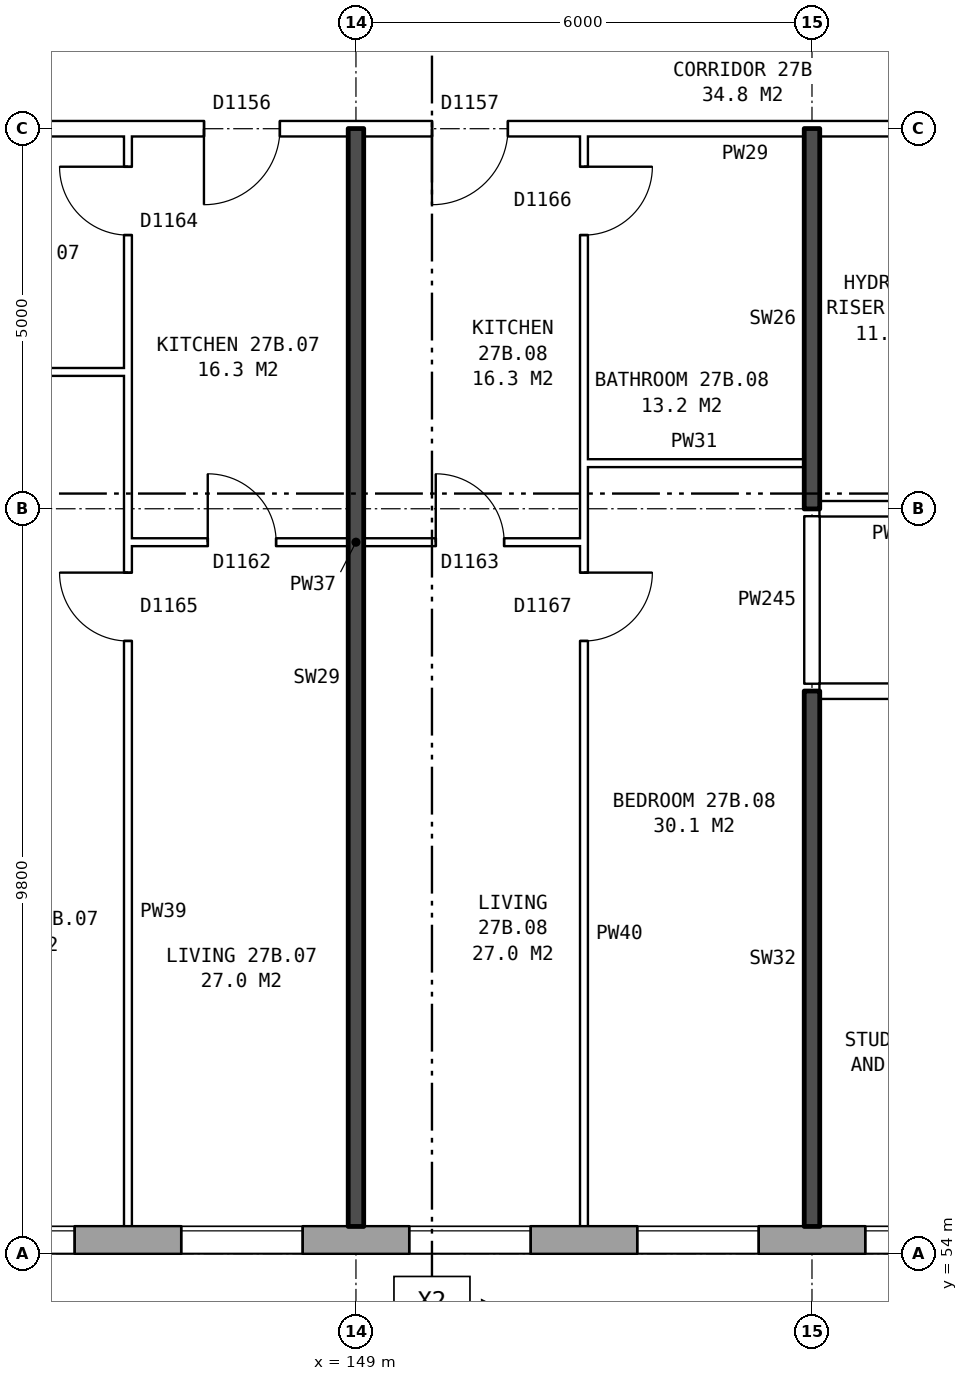
"""IFC4 building model, lengths in metres.
Left out: names, types, materials, properties, quantities, classifications, styles, units other than length and angle.
Written with IfcOpenShell. Run it as: python <this file> out.ifc"""

import sys

from ifc_helpers import new_model, si_unit, direction, frame, frame_2d, origin, place, context, subcontext, project, spatial, rectangle, extrude, element, fill, save


model = new_model("IFC4")
c1 = context("Model", 3, precision=1e-05, world=origin(), true_north=direction((0.0, 1.0)))
c2 = subcontext(c1, "Body", "Model", "MODEL_VIEW")
j1 = project(units=[si_unit("LENGTHUNIT", "METRE"), si_unit("PLANEANGLEUNIT", "RADIAN")], contexts=[c1])
p1 = place(None, origin())
s1 = spatial("IfcSite", under=j1, at=p1, CompositionType="ELEMENT")
p2 = place(p1, origin())
s2 = spatial("IfcBuilding", under=s1, at=p2, CompositionType="ELEMENT")
p3 = place(p2, frame((0.0, 0.0, 99.5)))
s3 = spatial("IfcBuildingStorey", under=s2, at=p3, CompositionType="ELEMENT", Elevation=99.5)
p4 = place(p3, frame((134.075, 54.18, 0.0), z_axis=(0.0, 0.0, 1.0), x_axis=(1.0, 0.0, 0.0)))
e1 = element("IfcWall", 1, at=p4, inside=s3, PredefinedType="STANDARD", context=c2, shape_type="SweptSolid", body=[
    extrude(rectangle(XDim=36.851, YDim=0.36, at=frame_2d((18.425, 0.0))), origin(), (0.0, 0.0, 1.0), 2.85),
])
p5 = place(p4, frame((0.3, 0.0, 0.8)))
e2 = element("IfcOpeningElement", 2, at=p5, cuts=e1, PredefinedType="OPENING", context=c2, shape_type="SweptSolid", body=[
    extrude(rectangle(XDim=1.0, YDim=1.8, at=frame_2d((0.5, 0.9))), frame((0.0, 0.19, 0.0), z_axis=(0.0, -1.0, 0.0), x_axis=(1.0, 0.0, 0.0)), (0.0, 0.0, 1.0), 0.38),
])
p6 = place(p4, frame((3.575, 0.0, 0.8)))
e3 = element("IfcOpeningElement", 3, at=p6, cuts=e1, PredefinedType="OPENING", context=c2, shape_type="SweptSolid", body=[
    extrude(rectangle(XDim=0.8, YDim=0.9, at=frame_2d((0.4, 0.45))), frame((0.0, 0.19, 0.0), z_axis=(0.0, -1.0, 0.0), x_axis=(1.0, 0.0, 0.0)), (0.0, 0.0, 1.0), 0.38),
])
p7 = place(p4, frame((6.625, 0.0, 0.8)))
e4 = element("IfcOpeningElement", 4, at=p7, cuts=e1, PredefinedType="OPENING", context=c2, shape_type="SweptSolid", body=[
    extrude(rectangle(XDim=1.6, YDim=1.8, at=frame_2d((0.8, 0.9))), frame((0.0, 0.19, 0.0), z_axis=(0.0, -1.0, 0.0), x_axis=(1.0, 0.0, 0.0)), (0.0, 0.0, 1.0), 0.38),
])
p8 = place(p4, frame((9.625, 0.0, 0.8)))
e5 = element("IfcOpeningElement", 5, at=p8, cuts=e1, PredefinedType="OPENING", context=c2, shape_type="SweptSolid", body=[
    extrude(rectangle(XDim=1.6, YDim=1.8, at=frame_2d((0.8, 0.9))), frame((0.0, 0.19, 0.0), z_axis=(0.0, -1.0, 0.0), x_axis=(1.0, 0.0, 0.0)), (0.0, 0.0, 1.0), 0.38),
])
p9 = place(p4, frame((12.625, 0.0, 0.8)))
e6 = element("IfcOpeningElement", 6, at=p9, cuts=e1, PredefinedType="OPENING", context=c2, shape_type="SweptSolid", body=[
    extrude(rectangle(XDim=1.6, YDim=1.8, at=frame_2d((0.8, 0.9))), frame((0.0, 0.19, 0.0), z_axis=(0.0, -1.0, 0.0), x_axis=(1.0, 0.0, 0.0)), (0.0, 0.0, 1.0), 0.38),
])
p10 = place(p4, frame((15.625, 0.0, 0.8)))
e7 = element("IfcOpeningElement", 7, at=p10, cuts=e1, PredefinedType="OPENING", context=c2, shape_type="SweptSolid", body=[
    extrude(rectangle(XDim=1.6, YDim=1.8, at=frame_2d((0.8, 0.9))), frame((0.0, 0.19, 0.0), z_axis=(0.0, -1.0, 0.0), x_axis=(1.0, 0.0, 0.0)), (0.0, 0.0, 1.0), 0.38),
])
p11 = place(p4, frame((18.625, 0.0, 0.8)))
e8 = element("IfcOpeningElement", 8, at=p11, cuts=e1, PredefinedType="OPENING", context=c2, shape_type="SweptSolid", body=[
    extrude(rectangle(XDim=1.6, YDim=1.8, at=frame_2d((0.8, 0.9))), frame((0.0, 0.19, 0.0), z_axis=(0.0, -1.0, 0.0), x_axis=(1.0, 0.0, 0.0)), (0.0, 0.0, 1.0), 0.38),
])
p12 = place(p4, frame((21.625, 0.0, 0.8)))
e9 = element("IfcOpeningElement", 9, at=p12, cuts=e1, PredefinedType="OPENING", context=c2, shape_type="SweptSolid", body=[
    extrude(rectangle(XDim=1.6, YDim=1.8, at=frame_2d((0.8, 0.9))), frame((0.0, 0.19, 0.0), z_axis=(0.0, -1.0, 0.0), x_axis=(1.0, 0.0, 0.0)), (0.0, 0.0, 1.0), 0.38),
])
p13 = place(p4, frame((24.625, 0.0, 0.8)))
e10 = element("IfcOpeningElement", 10, at=p13, cuts=e1, PredefinedType="OPENING", context=c2, shape_type="SweptSolid", body=[
    extrude(rectangle(XDim=1.6, YDim=1.8, at=frame_2d((0.8, 0.9))), frame((0.0, 0.19, 0.0), z_axis=(0.0, -1.0, 0.0), x_axis=(1.0, 0.0, 0.0)), (0.0, 0.0, 1.0), 0.38),
])
p14 = place(p4, frame((27.625, 0.0, 0.8)))
e11 = element("IfcOpeningElement", 11, at=p14, cuts=e1, PredefinedType="OPENING", context=c2, shape_type="SweptSolid", body=[
    extrude(rectangle(XDim=1.6, YDim=1.8, at=frame_2d((0.8, 0.9))), frame((0.0, 0.19, 0.0), z_axis=(0.0, -1.0, 0.0), x_axis=(1.0, 0.0, 0.0)), (0.0, 0.0, 1.0), 0.38),
])
p15 = place(p4, frame((30.625, 0.0, 0.8)))
e12 = element("IfcOpeningElement", 12, at=p15, cuts=e1, PredefinedType="OPENING", context=c2, shape_type="SweptSolid", body=[
    extrude(rectangle(XDim=1.6, YDim=1.8, at=frame_2d((0.8, 0.9))), frame((0.0, 0.19, 0.0), z_axis=(0.0, -1.0, 0.0), x_axis=(1.0, 0.0, 0.0)), (0.0, 0.0, 1.0), 0.38),
])
p16 = place(p4, frame((34.425, 0.0, 1.7)))
e13 = element("IfcOpeningElement", 13, at=p16, cuts=e1, PredefinedType="OPENING", context=c2, shape_type="SweptSolid", body=[
    extrude(rectangle(XDim=0.8, YDim=0.9, at=frame_2d((0.4, 0.45))), frame((0.0, 0.19, 0.0), z_axis=(0.0, -1.0, 0.0), x_axis=(1.0, 0.0, 0.0)), (0.0, 0.0, 1.0), 0.38),
])
p17 = place(p4, frame((1.6, 0.0, 1.7)))
e14 = element("IfcOpeningElement", 14, at=p17, cuts=e1, PredefinedType="OPENING", context=c2, shape_type="SweptSolid", body=[
    extrude(rectangle(XDim=0.8, YDim=0.9, at=frame_2d((0.4, 0.45))), frame((0.0, 0.19, 0.0), z_axis=(0.0, -1.0, 0.0), x_axis=(1.0, 0.0, 0.0)), (0.0, 0.0, 1.0), 0.38),
])
p18 = place(p4, frame((4.675, 0.0, 0.8)))
e15 = element("IfcOpeningElement", 15, at=p18, cuts=e1, PredefinedType="OPENING", context=c2, shape_type="SweptSolid", body=[
    extrude(rectangle(XDim=1.6, YDim=1.8, at=frame_2d((0.8, 0.9))), frame((0.0, 0.19, 0.0), z_axis=(0.0, -1.0, 0.0), x_axis=(1.0, 0.0, 0.0)), (0.0, 0.0, 1.0), 0.38),
])
p19 = place(p4, frame((35.525, 0.0, 0.8)))
e16 = element("IfcOpeningElement", 16, at=p19, cuts=e1, PredefinedType="OPENING", context=c2, shape_type="SweptSolid", body=[
    extrude(rectangle(XDim=1.0, YDim=1.8, at=frame_2d((0.5, 0.9))), frame((0.0, 0.19, 0.0), z_axis=(0.0, -1.0, 0.0), x_axis=(1.0, 0.0, 0.0)), (0.0, 0.0, 1.0), 0.38),
])
p20 = place(p3, frame((155.1, 61.4, 0.0), z_axis=(0.0, 0.0, 1.0), x_axis=(1.0, 0.0, 0.0)))
e17 = element("IfcWall", 17, at=p20, inside=s3, PredefinedType="PARTITIONING", context=c2, shape_type="SweptSolid", body=[
    extrude(rectangle(XDim=18.54, YDim=0.2, at=frame_2d((9.27, 0.0))), origin(), (0.0, 0.0, 1.0), 2.85),
])
p21 = place(p20, frame((1.45, 0.0, 0.0)))
e18 = element("IfcOpeningElement", 18, at=p21, cuts=e17, PredefinedType="OPENING", context=c2, shape_type="SweptSolid", body=[
    extrude(rectangle(XDim=1.0, YDim=2.1, at=frame_2d((0.5, 1.05))), frame((0.0, 0.11, 0.0), z_axis=(0.0, -1.0, 0.0), x_axis=(1.0, 0.0, 0.0)), (0.0, 0.0, 1.0), 0.22),
])
p22 = place(p20, frame((9.6, 0.0, 0.0)))
e19 = element("IfcOpeningElement", 19, at=p22, cuts=e17, PredefinedType="OPENING", context=c2, shape_type="SweptSolid", body=[
    extrude(rectangle(XDim=1.0, YDim=2.1, at=frame_2d((0.5, 1.05))), frame((0.0, 0.11, 0.0), z_axis=(0.0, -1.0, 0.0), x_axis=(1.0, 0.0, 0.0)), (0.0, 0.0, 1.0), 0.22),
])
p23 = place(p20, frame((15.92, 0.0, 0.0)))
e20 = element("IfcOpeningElement", 20, at=p23, cuts=e17, PredefinedType="OPENING", context=c2, shape_type="SweptSolid", body=[
    extrude(rectangle(XDim=1.0, YDim=2.1, at=frame_2d((0.5, 1.05))), frame((0.0, 0.11, 0.0), z_axis=(0.0, -1.0, 0.0), x_axis=(1.0, 0.0, 0.0)), (0.0, 0.0, 1.0), 0.22),
])
p24 = place(p3, frame((146.0, 63.36, 0.0), z_axis=(0.0, 0.0, 1.0), x_axis=(1.0, 0.0, 0.0)))
e21 = element("IfcWall", 21, at=p24, inside=s3, PredefinedType="PARTITIONING", context=c2, shape_type="SweptSolid", body=[
    extrude(rectangle(XDim=6.0, YDim=0.1, at=frame_2d((3.0, 0.0))), origin(), (0.0, 0.0, 1.0), 2.85),
])
p25 = place(p24, frame((1.05, 0.0, 0.0)))
e22 = element("IfcOpeningElement", 22, at=p25, cuts=e21, PredefinedType="OPENING", context=c2, shape_type="SweptSolid", body=[
    extrude(rectangle(XDim=0.9, YDim=2.1, at=frame_2d((0.45, 1.05))), frame((0.0, 0.06, 0.0), z_axis=(0.0, -1.0, 0.0), x_axis=(1.0, 0.0, 0.0)), (0.0, 0.0, 1.0), 0.12),
])
p26 = place(p24, frame((4.05, 0.0, 0.0)))
e23 = element("IfcOpeningElement", 23, at=p26, cuts=e21, PredefinedType="OPENING", context=c2, shape_type="SweptSolid", body=[
    extrude(rectangle(XDim=0.9, YDim=2.1, at=frame_2d((0.45, 1.05))), frame((0.0, 0.06, 0.0), z_axis=(0.0, -1.0, 0.0), x_axis=(1.0, 0.0, 0.0)), (0.0, 0.0, 1.0), 0.12),
])
p27 = place(p3, frame((155.1, 63.8, 0.0), z_axis=(0.0, 0.0, 1.0), x_axis=(1.0, 0.0, 0.0)))
e24 = element("IfcWall", 24, at=p27, inside=s3, PredefinedType="PARTITIONING", context=c2, shape_type="SweptSolid", body=[
    extrude(rectangle(XDim=2.14, YDim=0.2, at=frame_2d((1.07, 0.0))), origin(), (0.0, 0.0, 1.0), 2.85),
])
p28 = place(p3, frame((152.0, 64.4, 0.0), z_axis=(0.0, 0.0, 1.0), x_axis=(1.0, 0.0, 0.0)))
e25 = element("IfcWall", 25, at=p28, inside=s3, PredefinedType="PARTITIONING", context=c2, shape_type="SweptSolid", body=[
    extrude(rectangle(XDim=2.9, YDim=0.1, at=frame_2d((1.45, 0.0))), origin(), (0.0, 0.0, 1.0), 2.85),
])
p29 = place(p3, frame((142.76, 65.6, 0.0), z_axis=(0.0, 0.0, 1.0), x_axis=(1.0, 0.0, 0.0)))
e26 = element("IfcWall", 26, at=p29, inside=s3, PredefinedType="PARTITIONING", context=c2, shape_type="SweptSolid", body=[
    extrude(rectangle(XDim=3.24, YDim=0.1, at=frame_2d((1.62, 0.0))), origin(), (0.0, 0.0, 1.0), 2.85),
])
p30 = place(p3, frame((142.76, 68.8, 0.0), z_axis=(0.0, 0.0, 1.0), x_axis=(1.0, 0.0, 0.0)))
e27 = element("IfcWall", 27, at=p30, inside=s3, PredefinedType="PARTITIONING", context=c2, shape_type="SweptSolid", body=[
    extrude(rectangle(XDim=14.48, YDim=0.2, at=frame_2d((7.24, 0.0))), origin(), (0.0, 0.0, 1.0), 2.85),
])
p31 = place(p30, frame((4.24, 0.0, 0.0)))
e28 = element("IfcOpeningElement", 28, at=p31, cuts=e27, PredefinedType="OPENING", context=c2, shape_type="SweptSolid", body=[
    extrude(rectangle(XDim=1.0, YDim=2.1, at=frame_2d((0.5, 1.05))), frame((0.0, 0.11, 0.0), z_axis=(0.0, -1.0, 0.0), x_axis=(1.0, 0.0, 0.0)), (0.0, 0.0, 1.0), 0.22),
])
p32 = place(p30, frame((7.24, 0.0, 0.0)))
e29 = element("IfcOpeningElement", 29, at=p32, cuts=e27, PredefinedType="OPENING", context=c2, shape_type="SweptSolid", body=[
    extrude(rectangle(XDim=1.0, YDim=2.1, at=frame_2d((0.5, 1.05))), frame((0.0, 0.11, 0.0), z_axis=(0.0, -1.0, 0.0), x_axis=(1.0, 0.0, 0.0)), (0.0, 0.0, 1.0), 0.22),
])
p33 = place(p3, frame((146.0, 54.36, 0.0), z_axis=(0.0, 0.0, 1.0), x_axis=(0.0, 1.0, 0.0)))
e30 = element("IfcWall", 30, at=p33, inside=s3, PredefinedType="PARTITIONING", context=c2, shape_type="SweptSolid", body=[
    extrude(rectangle(XDim=14.34, YDim=0.1, at=frame_2d((7.17, 0.0))), origin(), (0.0, 0.0, 1.0), 2.85),
])
p34 = place(p33, frame((7.7, 0.0, 0.0)))
e31 = element("IfcOpeningElement", 31, at=p34, cuts=e30, PredefinedType="OPENING", context=c2, shape_type="SweptSolid", body=[
    extrude(rectangle(XDim=0.9, YDim=2.1, at=frame_2d((0.45, 1.05))), frame((0.0, 0.06, 0.0), z_axis=(0.0, -1.0, 0.0), x_axis=(1.0, 0.0, 0.0)), (0.0, 0.0, 1.0), 0.12),
])
p35 = place(p33, frame((13.04, 0.0, 0.0)))
e32 = element("IfcOpeningElement", 32, at=p35, cuts=e30, PredefinedType="OPENING", context=c2, shape_type="SweptSolid", body=[
    extrude(rectangle(XDim=0.9, YDim=2.1, at=frame_2d((0.45, 1.05))), frame((0.0, 0.06, 0.0), z_axis=(0.0, -1.0, 0.0), x_axis=(1.0, 0.0, 0.0)), (0.0, 0.0, 1.0), 0.12),
])
p36 = place(p3, frame((149.0, 54.36, 0.0), z_axis=(0.0, 0.0, 1.0), x_axis=(0.0, 1.0, 0.0)))
e33 = element("IfcWall", 33, at=p36, inside=s3, PredefinedType="SOLIDWALL", context=c2, shape_type="SweptSolid", body=[
    extrude(rectangle(XDim=14.44, YDim=0.2, at=frame_2d((7.22, 0.0))), origin(), (0.0, 0.0, 1.0), 2.85),
])
p37 = place(p3, frame((152.0, 54.36, 0.0), z_axis=(0.0, 0.0, 1.0), x_axis=(0.0, 1.0, 0.0)))
e34 = element("IfcWall", 34, at=p37, inside=s3, PredefinedType="PARTITIONING", context=c2, shape_type="SweptSolid", body=[
    extrude(rectangle(XDim=14.34, YDim=0.1, at=frame_2d((7.17, 0.0))), origin(), (0.0, 0.0, 1.0), 2.85),
])
p38 = place(p37, frame((7.7, 0.0, 0.0)))
e35 = element("IfcOpeningElement", 35, at=p38, cuts=e34, PredefinedType="OPENING", context=c2, shape_type="SweptSolid", body=[
    extrude(rectangle(XDim=0.9, YDim=2.1, at=frame_2d((0.45, 1.05))), frame((0.0, 0.06, 0.0), z_axis=(0.0, -1.0, 0.0), x_axis=(1.0, 0.0, 0.0)), (0.0, 0.0, 1.0), 0.12),
])
p39 = place(p37, frame((13.04, 0.0, 0.0)))
e36 = element("IfcOpeningElement", 36, at=p39, cuts=e34, PredefinedType="OPENING", context=c2, shape_type="SweptSolid", body=[
    extrude(rectangle(XDim=0.9, YDim=2.1, at=frame_2d((0.45, 1.05))), frame((0.0, 0.06, 0.0), z_axis=(0.0, -1.0, 0.0), x_axis=(1.0, 0.0, 0.0)), (0.0, 0.0, 1.0), 0.12),
])
p40 = place(p3, frame((155.0, 54.36, 0.0), z_axis=(0.0, 0.0, 1.0), x_axis=(0.0, 1.0, 0.0)))
e37 = element("IfcWall", 37, at=p40, inside=s3, PredefinedType="SOLIDWALL", context=c2, shape_type="SweptSolid", body=[
    extrude(rectangle(XDim=7.04, YDim=0.2, at=frame_2d((3.52, 0.0))), origin(), (0.0, 0.0, 1.0), 2.85),
])
p41 = place(p3, frame((155.0, 61.5, 0.0), z_axis=(0.0, 0.0, 1.0), x_axis=(0.0, 1.0, 0.0)))
e38 = element("IfcWall", 38, at=p41, inside=s3, PredefinedType="PARTITIONING", context=c2, shape_type="SweptSolid", body=[
    extrude(rectangle(XDim=2.2, YDim=0.2, at=frame_2d((1.1, 0.0))), origin(), (0.0, 0.0, 1.0), 2.85),
])
p42 = place(p3, frame((155.0, 63.8, 0.0), z_axis=(0.0, 0.0, 1.0), x_axis=(0.0, 1.0, 0.0)))
e39 = element("IfcWall", 39, at=p42, inside=s3, PredefinedType="SOLIDWALL", context=c2, shape_type="SweptSolid", body=[
    extrude(rectangle(XDim=5.0, YDim=0.2, at=frame_2d((2.5, 0.0))), origin(), (0.0, 0.0, 1.0), 2.85),
])
p43 = place(p8, origin())
e40 = element("IfcWindow", 40, at=p43, inside=s3, PartitioningType="SINGLE_PANEL", PredefinedType="WINDOW", context=c2, shape_type="SweptSolid", body=[
    extrude(rectangle(XDim=1.6, YDim=1.8, at=frame_2d((0.8, 0.9))), frame((0.0, 0.15, 0.0), z_axis=(0.0, -1.0, 0.0), x_axis=(1.0, 0.0, 0.0)), (0.0, 0.0, 1.0), 0.06),
])
fill(e5, e40)
p44 = place(p9, origin())
e41 = element("IfcWindow", 41, at=p44, inside=s3, PartitioningType="SINGLE_PANEL", PredefinedType="WINDOW", context=c2, shape_type="SweptSolid", body=[
    extrude(rectangle(XDim=1.6, YDim=1.8, at=frame_2d((0.8, 0.9))), frame((0.0, 0.15, 0.0), z_axis=(0.0, -1.0, 0.0), x_axis=(1.0, 0.0, 0.0)), (0.0, 0.0, 1.0), 0.06),
])
fill(e6, e41)
p45 = place(p10, origin())
e42 = element("IfcWindow", 42, at=p45, inside=s3, PartitioningType="SINGLE_PANEL", PredefinedType="WINDOW", context=c2, shape_type="SweptSolid", body=[
    extrude(rectangle(XDim=1.6, YDim=1.8, at=frame_2d((0.8, 0.9))), frame((0.0, 0.15, 0.0), z_axis=(0.0, -1.0, 0.0), x_axis=(1.0, 0.0, 0.0)), (0.0, 0.0, 1.0), 0.06),
])
fill(e7, e42)
p46 = place(p11, origin())
e43 = element("IfcWindow", 43, at=p46, inside=s3, PartitioningType="SINGLE_PANEL", PredefinedType="WINDOW", context=c2, shape_type="SweptSolid", body=[
    extrude(rectangle(XDim=1.6, YDim=1.8, at=frame_2d((0.8, 0.9))), frame((0.0, 0.15, 0.0), z_axis=(0.0, -1.0, 0.0), x_axis=(1.0, 0.0, 0.0)), (0.0, 0.0, 1.0), 0.06),
])
fill(e8, e43)
p47 = place(p12, origin())
e44 = element("IfcWindow", 44, at=p47, inside=s3, PartitioningType="SINGLE_PANEL", PredefinedType="WINDOW", context=c2, shape_type="SweptSolid", body=[
    extrude(rectangle(XDim=1.6, YDim=1.8, at=frame_2d((0.8, 0.9))), frame((0.0, 0.15, 0.0), z_axis=(0.0, -1.0, 0.0), x_axis=(1.0, 0.0, 0.0)), (0.0, 0.0, 1.0), 0.06),
])
fill(e9, e44)
p48 = place(p34, origin())
e45 = element("IfcDoor", 45, at=p48, inside=s3, OperationType="SINGLE_SWING_RIGHT", PredefinedType="DOOR", context=c2, shape_type="SweptSolid", body=[
    extrude(rectangle(XDim=0.9, YDim=2.1, at=frame_2d((0.45, 1.05))), frame((0.0, 0.025, 0.0), z_axis=(0.0, -1.0, 0.0), x_axis=(1.0, 0.0, 0.0)), (0.0, 0.0, 1.0), 0.05),
])
fill(e31, e45)
p49 = place(p31, frame((1.0, 0.0, 0.0), z_axis=(0.0, 0.0, 1.0), x_axis=(-1.0, 0.0, 0.0)))
e46 = element("IfcDoor", 46, at=p49, inside=s3, OperationType="SINGLE_SWING_RIGHT", PredefinedType="DOOR", context=c2, shape_type="SweptSolid", body=[
    extrude(rectangle(XDim=1.0, YDim=2.1, at=frame_2d((0.5, 1.05))), frame((0.0, 0.025, 0.0), z_axis=(0.0, -1.0, 0.0), x_axis=(1.0, 0.0, 0.0)), (0.0, 0.0, 1.0), 0.05),
])
fill(e28, e46)
p50 = place(p25, origin())
e47 = element("IfcDoor", 47, at=p50, inside=s3, OperationType="SINGLE_SWING_LEFT", PredefinedType="DOOR", context=c2, shape_type="SweptSolid", body=[
    extrude(rectangle(XDim=0.9, YDim=2.1, at=frame_2d((0.45, 1.05))), frame((0.0, 0.025, 0.0), z_axis=(0.0, -1.0, 0.0), x_axis=(1.0, 0.0, 0.0)), (0.0, 0.0, 1.0), 0.05),
])
fill(e22, e47)
p51 = place(p35, origin())
e48 = element("IfcDoor", 48, at=p51, inside=s3, OperationType="SINGLE_SWING_RIGHT", PredefinedType="DOOR", context=c2, shape_type="SweptSolid", body=[
    extrude(rectangle(XDim=0.9, YDim=2.1, at=frame_2d((0.45, 1.05))), frame((0.0, 0.025, 0.0), z_axis=(0.0, -1.0, 0.0), x_axis=(1.0, 0.0, 0.0)), (0.0, 0.0, 1.0), 0.05),
])
fill(e32, e48)
p52 = place(p38, frame((0.9, 0.0, 0.0), z_axis=(0.0, 0.0, 1.0), x_axis=(-1.0, 0.0, 0.0)))
e49 = element("IfcDoor", 49, at=p52, inside=s3, OperationType="SINGLE_SWING_LEFT", PredefinedType="DOOR", context=c2, shape_type="SweptSolid", body=[
    extrude(rectangle(XDim=0.9, YDim=2.1, at=frame_2d((0.45, 1.05))), frame((0.0, 0.025, 0.0), z_axis=(0.0, -1.0, 0.0), x_axis=(1.0, 0.0, 0.0)), (0.0, 0.0, 1.0), 0.05),
])
fill(e35, e49)
p53 = place(p32, frame((1.0, 0.0, 0.0), z_axis=(0.0, 0.0, 1.0), x_axis=(-1.0, 0.0, 0.0)))
e50 = element("IfcDoor", 50, at=p53, inside=s3, OperationType="SINGLE_SWING_RIGHT", PredefinedType="DOOR", context=c2, shape_type="SweptSolid", body=[
    extrude(rectangle(XDim=1.0, YDim=2.1, at=frame_2d((0.5, 1.05))), frame((0.0, 0.025, 0.0), z_axis=(0.0, -1.0, 0.0), x_axis=(1.0, 0.0, 0.0)), (0.0, 0.0, 1.0), 0.05),
])
fill(e29, e50)
p54 = place(p26, origin())
e51 = element("IfcDoor", 51, at=p54, inside=s3, OperationType="SINGLE_SWING_LEFT", PredefinedType="DOOR", context=c2, shape_type="SweptSolid", body=[
    extrude(rectangle(XDim=0.9, YDim=2.1, at=frame_2d((0.45, 1.05))), frame((0.0, 0.025, 0.0), z_axis=(0.0, -1.0, 0.0), x_axis=(1.0, 0.0, 0.0)), (0.0, 0.0, 1.0), 0.05),
])
fill(e23, e51)
p55 = place(p39, frame((0.9, 0.0, 0.0), z_axis=(0.0, 0.0, 1.0), x_axis=(-1.0, 0.0, 0.0)))
e52 = element("IfcDoor", 52, at=p55, inside=s3, OperationType="SINGLE_SWING_LEFT", PredefinedType="DOOR", context=c2, shape_type="SweptSolid", body=[
    extrude(rectangle(XDim=0.9, YDim=2.1, at=frame_2d((0.45, 1.05))), frame((0.0, 0.025, 0.0), z_axis=(0.0, -1.0, 0.0), x_axis=(1.0, 0.0, 0.0)), (0.0, 0.0, 1.0), 0.05),
])
fill(e36, e52)
save(model, sys.argv[1])
